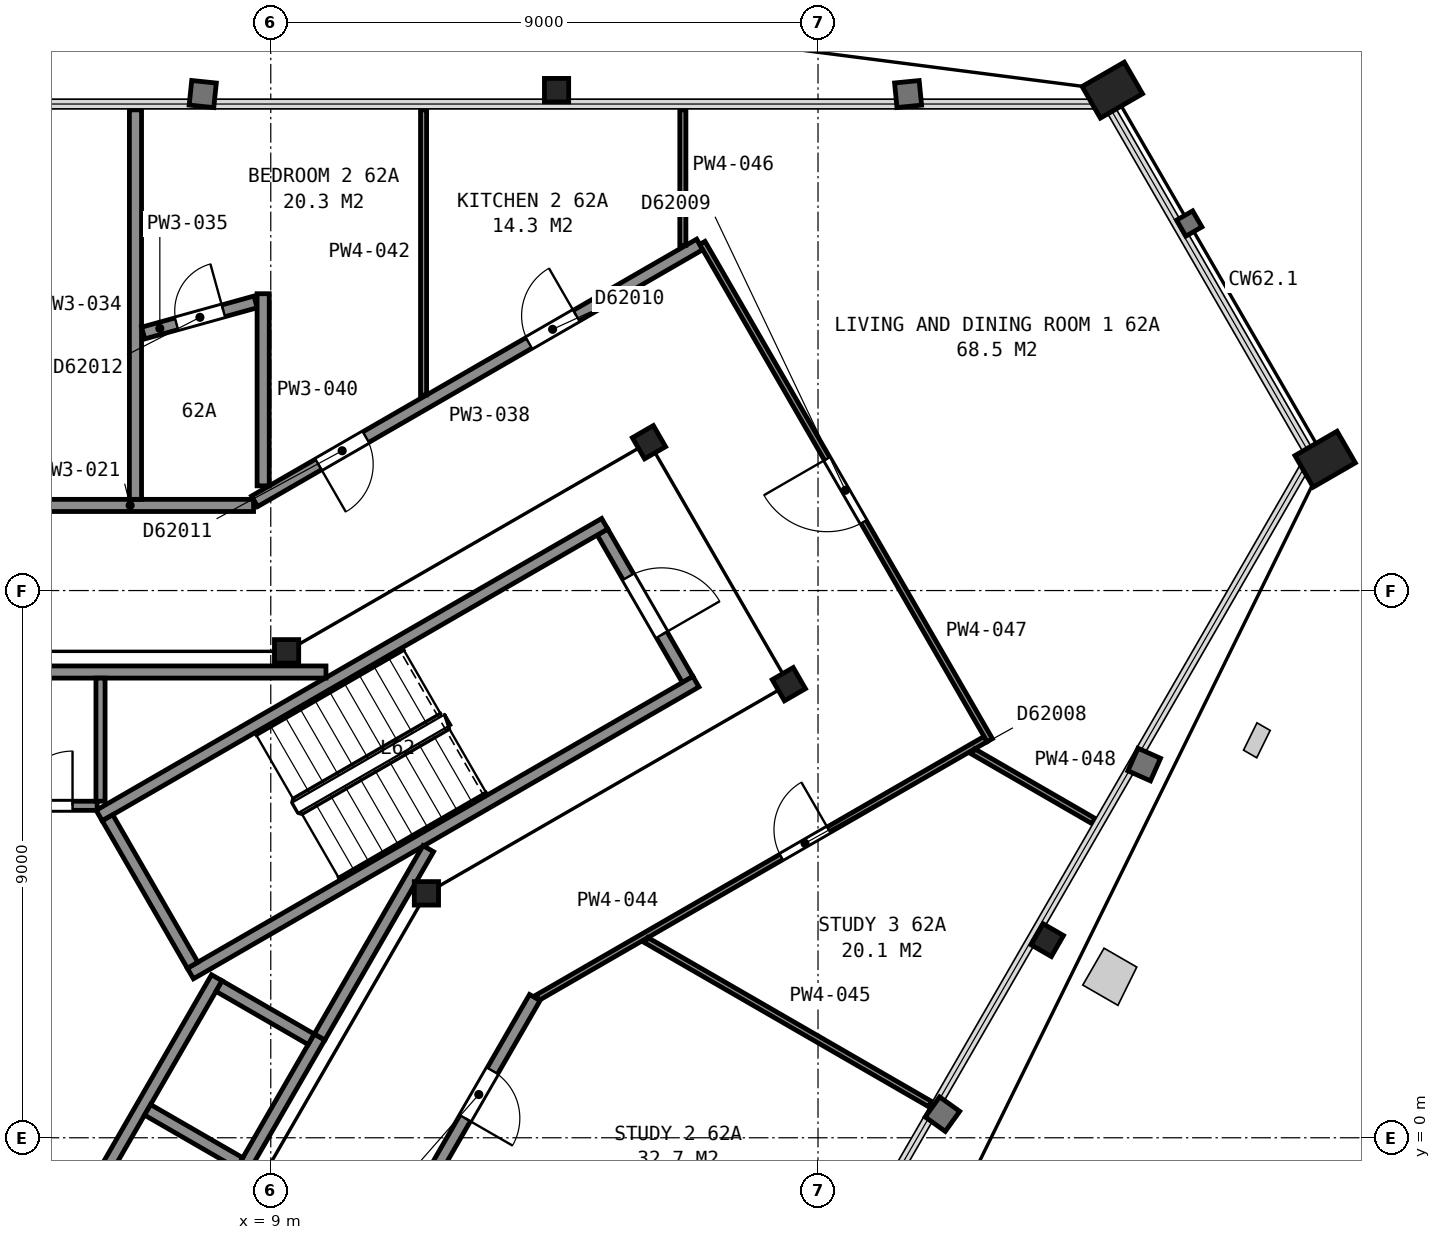
"""IFC4 building model, lengths in metres.
Left out: names, types, materials, properties, quantities, classifications, styles, units other than length and angle.
Written with IfcOpenShell. Run it as: python <this file> out.ifc"""

import sys

from ifc_helpers import new_model, si_unit, direction, frame, frame_2d, origin, origin_2d, place, context, subcontext, project, spatial, rectangle, hollow_rectangle, i_section, extrude, element, fill, save


model = new_model("IFC4")
c1 = context("Model", 3, precision=1e-05, world=origin(), true_north=direction((0.0, 1.0)))
c2 = subcontext(c1, "Body", "Model", "MODEL_VIEW")
j1 = project(units=[si_unit("LENGTHUNIT", "METRE"), si_unit("PLANEANGLEUNIT", "RADIAN")], contexts=[c1])
p1 = place(None, origin())
s1 = spatial("IfcSite", under=j1, at=p1, CompositionType="ELEMENT")
p2 = place(p1, origin())
s2 = spatial("IfcBuilding", under=s1, at=p2, CompositionType="ELEMENT")
p3 = place(p2, frame((0.0, 0.0, 247.1)))
s3 = spatial("IfcBuildingStorey", under=s2, at=p3, CompositionType="ELEMENT", Elevation=247.1)
p4 = place(p3, frame((22.84, 17.23, 0.065), z_axis=(0.0, 0.0, 1.0), x_axis=(0.5, -0.866025403784, 0.0)))
e1 = element("IfcColumn", 1, at=p4, inside=s3, PredefinedType="COLUMN", context=c2, shape_type="SweptSolid", body=[
    extrude(hollow_rectangle(XDim=0.6, YDim=0.8, WallThickness=0.05, at=origin_2d()), origin(), (0.0, 0.0, 1.0), 3.635),
])
for number, where, z_axis, x_axis in (
    (2, (13.7, 17.23, 0.035), (0.0, 0.0, 1.0), (1.0, 0.0, 0.0)),
    (3, (21.77, 3.25, 0.035), (0.0, 0.0, 1.0), (-0.5, -0.866, 0.0)),
):
    element("IfcColumn", number, at=place(p3, frame(where, z_axis=z_axis, x_axis=x_axis)), inside=s3, PredefinedType="COLUMN", context=c2, shape_type="SweptSolid", body=[
        extrude(i_section(OverallWidth=0.399, OverallDepth=0.386, WebThickness=0.021, FlangeThickness=0.033, FilletRadius=0.015, at=origin_2d()), origin(), (0.0, 0.0, 1.0), 3.665),
    ])
p5 = place(p3, frame((26.34, 11.16, 0.065), z_axis=(0.0, 0.0, 1.0), x_axis=(0.5, -0.866025403784, 0.0)))
e4 = element("IfcColumn", 4, at=p5, inside=s3, PredefinedType="COLUMN", context=c2, shape_type="SweptSolid", body=[
    extrude(hollow_rectangle(XDim=0.6, YDim=0.8, WallThickness=0.05, at=origin_2d()), origin(), (0.0, 0.0, 1.0), 3.635),
])
p6 = place(p3, frame((11.56, 4.02, 0.0), z_axis=(0.0, 0.0, 1.0), x_axis=(1.0, 0.0, 0.0)))
e5 = element("IfcColumn", 5, at=p6, inside=s3, PredefinedType="COLUMN", context=c2, shape_type="SweptSolid", body=[
    extrude(i_section(OverallWidth=0.399, OverallDepth=0.386, WebThickness=0.021, FlangeThickness=0.033, FilletRadius=0.015, at=origin_2d()), origin(), (0.0, 0.0, 1.0), 3.7),
])
for number, where, z_axis, x_axis in (
    (6, (17.52, 7.46, 0.0), (0.0, 0.0, 1.0), (0.5, -0.866, 0.0)),
    (7, (15.22, 11.44, 0.0), (0.0, 0.0, 1.0), (0.5, -0.866, 0.0)),
):
    element("IfcColumn", number, at=place(p3, frame(where, z_axis=z_axis, x_axis=x_axis)), inside=s3, PredefinedType="COLUMN", context=c2, shape_type="SweptSolid", body=[
        extrude(i_section(OverallWidth=0.401, OverallDepth=0.399, WebThickness=0.025, FlangeThickness=0.04, FilletRadius=0.015, at=origin_2d()), origin(), (0.0, 0.0, 1.0), 3.7),
    ])
p7 = place(p3, frame((9.26, 8.0, 0.0), z_axis=(0.0, 0.0, 1.0), x_axis=(1.0, 0.0, 0.0)))
e8 = element("IfcColumn", 8, at=p7, inside=s3, PredefinedType="COLUMN", context=c2, shape_type="SweptSolid", body=[
    extrude(i_section(OverallWidth=0.399, OverallDepth=0.386, WebThickness=0.021, FlangeThickness=0.033, FilletRadius=0.015, at=origin_2d()), origin(), (0.0, 0.0, 1.0), 3.7),
])
p8 = place(p3, frame((15.855, 7.538, 0.0), z_axis=(0.0, 0.0, 1.0), x_axis=(-0.500049511043, 0.865996816683, 0.0)))
e9 = element("IfcWall", 9, at=p8, inside=s3, PredefinedType="PARTITIONING", context=c2, shape_type="SweptSolid", body=[
    extrude(rectangle(XDim=2.8, YDim=0.2, at=frame_2d((1.4, 0.0))), origin(), (0.0, 0.0, 1.0), 3.45),
])
p9 = place(p8, frame((0.85, 0.0, 0.0)))
e10 = element("IfcOpeningElement", 10, at=p9, cuts=e9, PredefinedType="OPENING", context=c2, shape_type="SweptSolid", body=[
    extrude(rectangle(XDim=1.1, YDim=2.1, at=frame_2d((0.55, 1.05))), frame((0.0, 0.11, 0.0), z_axis=(0.0, -1.0, 0.0), x_axis=(1.0, 0.0, 0.0)), (0.0, 0.0, 1.0), 0.22),
])
for number, where, z_axis, x_axis in (
    (11, (6.178, 5.299, 0.0), (0.0, 0.0, 1.0), (0.866, 0.5, 0.0)),
    (12, (7.678, 2.701, 0.0), (0.0, 0.0, 1.0), (0.866, 0.5, 0.0)),
):
    element("IfcWall", number, at=place(p3, frame(where, z_axis=z_axis, x_axis=x_axis)), inside=s3, PredefinedType="PARTITIONING", context=c2, shape_type="SweptSolid", body=[
        extrude(rectangle(XDim=9.6, YDim=0.2, at=frame_2d((4.8, 0.0))), origin(), (0.0, 0.0, 1.0), 3.45),
    ])
p10 = place(p3, frame((7.715, 2.838, 0.0), z_axis=(0.0, 0.0, 1.0), x_axis=(-0.500049511043, 0.865996816683, 0.0)))
e13 = element("IfcWall", 13, at=p10, inside=s3, PredefinedType="PARTITIONING", context=c2, shape_type="SweptSolid", body=[
    extrude(rectangle(XDim=2.8, YDim=0.2, at=frame_2d((1.4, 0.0))), origin(), (0.0, 0.0, 1.0), 3.45),
])
p11 = place(p3, frame((7.351, -2.587, 0.0), z_axis=(0.0, 0.0, 1.0), x_axis=(0.500002801628, 0.866023786258, 0.0)))
e14 = element("IfcWall", 14, at=p11, inside=s3, PredefinedType="PARTITIONING", context=c2, shape_type="SweptSolid", body=[
    extrude(rectangle(XDim=4.9, YDim=0.2, at=frame_2d((2.45, 0.0))), origin(), (0.0, 0.0, 1.0), 3.7),
])
p12 = place(p3, frame((5.663, -1.612, 0.0), z_axis=(0.0, 0.0, 1.0), x_axis=(0.49998122708, 0.866036242063, 0.0)))
e15 = element("IfcWall", 15, at=p12, inside=s3, PredefinedType="PARTITIONING", context=c2, shape_type="SweptSolid", body=[
    extrude(rectangle(XDim=4.9, YDim=0.2, at=frame_2d((2.45, 0.0))), origin(), (0.0, 0.0, 1.0), 3.7),
])
p13 = place(p3, frame((9.665, 1.62, 0.0), z_axis=(0.0, 0.0, 1.0), x_axis=(-0.866002029911, 0.500040482552, 0.0)))
e16 = element("IfcWall", 16, at=p13, inside=s3, PredefinedType="PARTITIONING", context=c2, shape_type="SweptSolid", body=[
    extrude(rectangle(XDim=1.75, YDim=0.2, at=frame_2d((0.875, 0.0))), origin(), (0.0, 0.0, 1.0), 3.7),
])
p14 = place(p3, frame((8.49, -0.416, 0.0), z_axis=(0.0, 0.0, 1.0), x_axis=(-0.866036909293, 0.499980071345, 0.0)))
e17 = element("IfcWall", 17, at=p14, inside=s3, PredefinedType="PARTITIONING", context=c2, shape_type="SweptSolid", body=[
    extrude(rectangle(XDim=1.75, YDim=0.2, at=frame_2d((0.875, 0.0))), origin(), (0.0, 0.0, 1.0), 3.7),
])
p15 = place(p3, frame((-3.933, 7.66, 0.0), z_axis=(0.0, 0.0, 1.0), x_axis=(1.0, 0.0, 0.0)))
e18 = element("IfcWall", 18, at=p15, inside=s3, PredefinedType="PARTITIONING", context=c2, shape_type="SweptSolid", body=[
    extrude(rectangle(XDim=13.841, YDim=0.2, at=frame_2d((6.92, 0.0))), origin(), (0.0, 0.0, 1.0), 3.45),
])
p16 = place(p3, frame((0.925, 5.46, 0.0), z_axis=(0.0, 0.0, 1.0), x_axis=(1.0, 0.0, 0.0)))
e19 = element("IfcWall", 19, at=p16, inside=s3, PredefinedType="PARTITIONING", context=c2, shape_type="SweptSolid", body=[
    extrude(rectangle(XDim=5.22, YDim=0.15, at=frame_2d((2.61, 0.0))), origin(), (0.0, 0.0, 1.0), 3.45),
])
p17 = place(p16, frame((3.915, 0.0, 0.0)))
e20 = element("IfcOpeningElement", 20, at=p17, cuts=e19, PredefinedType="OPENING", context=c2, shape_type="SweptSolid", body=[
    extrude(rectangle(XDim=0.9, YDim=2.1, at=frame_2d((0.45, 1.05))), frame((0.0, 0.085, 0.0), z_axis=(0.0, -1.0, 0.0), x_axis=(1.0, 0.0, 0.0)), (0.0, 0.0, 1.0), 0.17),
])
p18 = place(p3, frame((6.2, 5.535, 0.0), z_axis=(0.0, 0.0, 1.0), x_axis=(0.0, 1.0, 0.0)))
e21 = element("IfcWall", 21, at=p18, inside=s3, PredefinedType="PARTITIONING", context=c2, shape_type="SweptSolid", body=[
    extrude(rectangle(XDim=2.025, YDim=0.15, at=frame_2d((1.013, 0.0))), origin(), (0.0, 0.0, 1.0), 3.45),
])
p19 = place(p3, frame((9.803, 1.658, 0.0), z_axis=(0.0, 0.0, 1.0), x_axis=(0.499943114462, 0.866058244174, 0.0)))
e22 = element("IfcWall", 22, at=p19, inside=s3, PredefinedType="PARTITIONING", context=c2, shape_type="SweptSolid", body=[
    extrude(rectangle(XDim=3.576, YDim=0.2, at=frame_2d((1.788, 0.0))), origin(), (0.0, 0.0, 1.0), 3.45),
])
p20 = place(p3, frame((-8.667, 10.4, 0.0), z_axis=(0.0, 0.0, 1.0), x_axis=(1.0, 0.0, 0.0)))
e23 = element("IfcWall", 23, at=p20, inside=s3, PredefinedType="PARTITIONING", context=c2, shape_type="SweptSolid", body=[
    extrude(rectangle(XDim=17.384, YDim=0.2, at=frame_2d((8.692, 0.0))), origin(), (0.0, 0.0, 1.0), 2.713),
])
p21 = place(p20, frame((12.425, 0.0, 0.0)))
e24 = element("IfcOpeningElement", 24, at=p21, cuts=e23, PredefinedType="OPENING", context=c2, shape_type="SweptSolid", body=[
    extrude(rectangle(XDim=0.9, YDim=2.1, at=frame_2d((0.45, 1.05))), frame((0.0, 0.11, 0.0), z_axis=(0.0, -1.0, 0.0), x_axis=(1.0, 0.0, 0.0)), (0.0, 0.0, 1.0), 0.22),
])
p22 = place(p20, frame((7.716, 0.0, 0.0)))
e25 = element("IfcOpeningElement", 25, at=p22, cuts=e23, PredefinedType="OPENING", context=c2, shape_type="SweptSolid", body=[
    extrude(rectangle(XDim=0.9, YDim=2.1, at=frame_2d((0.45, 1.05))), frame((0.0, 0.11, 0.0), z_axis=(0.0, -1.0, 0.0), x_axis=(1.0, 0.0, 0.0)), (0.0, 0.0, 1.0), 0.22),
])
p23 = place(p20, frame((3.358, 0.0, 0.0)))
e26 = element("IfcOpeningElement", 26, at=p23, cuts=e23, PredefinedType="OPENING", context=c2, shape_type="SweptSolid", body=[
    extrude(rectangle(XDim=0.9, YDim=2.1, at=frame_2d((0.45, 1.05))), frame((0.0, 0.11, 0.0), z_axis=(0.0, -1.0, 0.0), x_axis=(1.0, 0.0, 0.0)), (0.0, 0.0, 1.0), 0.22),
])
p24 = place(p3, frame((13.342, 2.306, 0.0), z_axis=(0.0, 0.0, 1.0), x_axis=(-0.499983003136, -0.866035216706, 0.0)))
e27 = element("IfcWall", 27, at=p24, inside=s3, PredefinedType="PARTITIONING", context=c2, shape_type="SweptSolid", body=[
    extrude(rectangle(XDim=17.385, YDim=0.2, at=frame_2d((8.692, 0.0))), origin(), (0.0, 0.0, 1.0), 2.713),
])
p25 = place(p24, frame((15.185, 0.0, 0.0)))
e28 = element("IfcOpeningElement", 28, at=p25, cuts=e27, PredefinedType="OPENING", context=c2, shape_type="SweptSolid", body=[
    extrude(rectangle(XDim=0.9, YDim=2.1, at=frame_2d((0.45, 1.05))), frame((0.0, 0.11, 0.0), z_axis=(0.0, -1.0, 0.0), x_axis=(1.0, 0.0, 0.0)), (0.0, 0.0, 1.0), 0.22),
])
p26 = place(p24, frame((12.094, 0.0, 0.0)))
e29 = element("IfcOpeningElement", 29, at=p26, cuts=e27, PredefinedType="OPENING", context=c2, shape_type="SweptSolid", body=[
    extrude(rectangle(XDim=0.9, YDim=2.1, at=frame_2d((0.45, 1.05))), frame((0.0, 0.11, 0.0), z_axis=(0.0, -1.0, 0.0), x_axis=(1.0, 0.0, 0.0)), (0.0, 0.0, 1.0), 0.22),
])
p27 = place(p24, frame((5.867, 0.0, 0.0)))
e30 = element("IfcOpeningElement", 30, at=p27, cuts=e27, PredefinedType="OPENING", context=c2, shape_type="SweptSolid", body=[
    extrude(rectangle(XDim=0.9, YDim=2.1, at=frame_2d((0.45, 1.05))), frame((0.0, 0.11, 0.0), z_axis=(0.0, -1.0, 0.0), x_axis=(1.0, 0.0, 0.0)), (0.0, 0.0, 1.0), 0.22),
])
p28 = place(p24, frame((1.392, 0.0, 0.0)))
e31 = element("IfcOpeningElement", 31, at=p28, cuts=e27, PredefinedType="OPENING", context=c2, shape_type="SweptSolid", body=[
    extrude(rectangle(XDim=0.9, YDim=2.1, at=frame_2d((0.45, 1.05))), frame((0.0, 0.11, 0.0), z_axis=(0.0, -1.0, 0.0), x_axis=(1.0, 0.0, 0.0)), (0.0, 0.0, 1.0), 0.22),
])
p29 = place(p3, frame((6.775, 10.5, 0.0), z_axis=(0.0, 0.0, 1.0), x_axis=(0.0, 1.0, 0.0)))
e32 = element("IfcWall", 32, at=p29, inside=s3, PredefinedType="PARTITIONING", context=c2, shape_type="SweptSolid", body=[
    extrude(rectangle(XDim=6.406, YDim=0.2, at=frame_2d((3.203, 0.0))), origin(), (0.0, 0.0, 1.0), 2.713),
])
p30 = place(p3, frame((8.75, 13.747, 0.0), z_axis=(0.0, 0.0, 1.0), x_axis=(-0.963674591663, -0.267079166884, 0.0)))
e33 = element("IfcWall", 33, at=p30, inside=s3, PredefinedType="PARTITIONING", context=c2, shape_type="SweptSolid", body=[
    extrude(rectangle(XDim=1.918, YDim=0.2, at=frame_2d((0.959, 0.0))), origin(), (0.0, 0.0, 1.0), 2.713),
])
p31 = place(p30, frame((0.549, 0.0, 0.0)))
e34 = element("IfcOpeningElement", 34, at=p31, cuts=e33, PredefinedType="OPENING", context=c2, shape_type="SweptSolid", body=[
    extrude(rectangle(XDim=0.8, YDim=2.1, at=frame_2d((0.4, 1.05))), frame((0.0, 0.11, 0.0), z_axis=(0.0, -1.0, 0.0), x_axis=(1.0, 0.0, 0.0)), (0.0, 0.0, 1.0), 0.22),
])
p32 = place(p3, frame((8.734, 10.468, 0.0), z_axis=(0.0, 0.0, 1.0), x_axis=(0.86608074249, 0.499904138298, 0.0)))
e35 = element("IfcWall", 35, at=p32, inside=s3, PredefinedType="PARTITIONING", context=c2, shape_type="SweptSolid", body=[
    extrude(rectangle(XDim=8.453, YDim=0.2, at=frame_2d((4.227, 0.0))), origin(), (0.0, 0.0, 1.0), 2.713),
])
p33 = place(p32, frame((5.209, 0.0, 0.0)))
e36 = element("IfcOpeningElement", 36, at=p33, cuts=e35, PredefinedType="OPENING", context=c2, shape_type="SweptSolid", body=[
    extrude(rectangle(XDim=0.9, YDim=2.1, at=frame_2d((0.45, 1.05))), frame((0.0, 0.11, 0.0), z_axis=(0.0, -1.0, 0.0), x_axis=(1.0, 0.0, 0.0)), (0.0, 0.0, 1.0), 0.22),
])
p34 = place(p32, frame((1.213, 0.0, 0.0)))
e37 = element("IfcOpeningElement", 37, at=p34, cuts=e35, PredefinedType="OPENING", context=c2, shape_type="SweptSolid", body=[
    extrude(rectangle(XDim=0.9, YDim=2.1, at=frame_2d((0.45, 1.05))), frame((0.0, 0.11, 0.0), z_axis=(0.0, -1.0, 0.0), x_axis=(1.0, 0.0, 0.0)), (0.0, 0.0, 1.0), 0.22),
])
p35 = place(p3, frame((8.875, 10.722, 0.0), z_axis=(0.0, 0.0, 1.0), x_axis=(0.0, 1.0, 0.0)))
e38 = element("IfcWall", 38, at=p35, inside=s3, PredefinedType="PARTITIONING", context=c2, shape_type="SweptSolid", body=[
    extrude(rectangle(XDim=3.16, YDim=0.2, at=frame_2d((1.58, 0.0))), origin(), (0.0, 0.0, 1.0), 2.713),
])
p36 = place(p3, frame((11.513, 12.215, 0.0), z_axis=(0.0, 0.0, 1.0), x_axis=(0.0, 1.0, 0.0)))
e39 = element("IfcWall", 39, at=p36, inside=s3, PredefinedType="PARTITIONING", context=c2, shape_type="SweptSolid", body=[
    extrude(rectangle(XDim=4.691, YDim=0.1, at=frame_2d((2.345, 0.0))), origin(), (0.0, 0.0, 1.0), 2.713),
])
p37 = place(p3, frame((20.756, 6.557, 0.0), z_axis=(0.0, 0.0, 1.0), x_axis=(-0.86606177021, -0.499937006213, 0.0)))
e40 = element("IfcWall", 40, at=p37, inside=s3, PredefinedType="PARTITIONING", context=c2, shape_type="SweptSolid", body=[
    extrude(rectangle(XDim=8.504, YDim=0.1, at=frame_2d((4.252, 0.0))), origin(), (0.0, 0.0, 1.0), 2.713),
])
p38 = place(p37, frame((2.979, 0.0, 0.0)))
e41 = element("IfcOpeningElement", 41, at=p38, cuts=e40, PredefinedType="OPENING", context=c2, shape_type="SweptSolid", body=[
    extrude(rectangle(XDim=0.9, YDim=2.1, at=frame_2d((0.45, 1.05))), frame((0.0, 0.06, 0.0), z_axis=(0.0, -1.0, 0.0), x_axis=(1.0, 0.0, 0.0)), (0.0, 0.0, 1.0), 0.12),
])
p39 = place(p3, frame((15.176, 3.25, 0.0), z_axis=(0.0, 0.0, 1.0), x_axis=(0.865941828667, -0.500144728419, 0.0)))
e42 = element("IfcWall", 42, at=p39, inside=s3, PredefinedType="PARTITIONING", context=c2, shape_type="SweptSolid", body=[
    extrude(rectangle(XDim=5.388, YDim=0.1, at=frame_2d((2.694, 0.0))), origin(), (0.0, 0.0, 1.0), 2.713),
])
p40 = place(p3, frame((15.777, 14.677, 0.0), z_axis=(0.0, 0.0, 1.0), x_axis=(0.0, 1.0, 0.0)))
e43 = element("IfcWall", 43, at=p40, inside=s3, PredefinedType="PARTITIONING", context=c2, shape_type="SweptSolid", body=[
    extrude(rectangle(XDim=2.229, YDim=0.1, at=frame_2d((1.114, 0.0))), origin(), (0.0, 0.0, 1.0), 2.713),
])
p41 = place(p3, frame((16.098, 14.718, 0.0), z_axis=(0.0, 0.0, 1.0), x_axis=(0.50030257167, -0.86585064346, 0.0)))
e44 = element("IfcWall", 44, at=p41, inside=s3, PredefinedType="PARTITIONING", context=c2, shape_type="SweptSolid", body=[
    extrude(rectangle(XDim=9.447, YDim=0.1, at=frame_2d((4.723, 0.0))), origin(), (0.0, 0.0, 1.0), 2.713),
])
p42 = place(p41, frame((4.1, 0.0, 0.0)))
e45 = element("IfcOpeningElement", 45, at=p42, cuts=e44, PredefinedType="OPENING", context=c2, shape_type="SweptSolid", body=[
    extrude(rectangle(XDim=1.2, YDim=2.1, at=frame_2d((0.6, 1.05))), frame((0.0, 0.06, 0.0), z_axis=(0.0, -1.0, 0.0), x_axis=(1.0, 0.0, 0.0)), (0.0, 0.0, 1.0), 0.12),
])
p43 = place(p3, frame((20.552, 6.353, 0.0), z_axis=(0.0, 0.0, 1.0), x_axis=(0.865865073245, -0.500277597875, 0.0)))
e46 = element("IfcWall", 46, at=p43, inside=s3, PredefinedType="PARTITIONING", context=c2, shape_type="SweptSolid", body=[
    extrude(rectangle(XDim=2.284, YDim=0.1, at=frame_2d((1.142, 0.0))), origin(), (0.0, 0.0, 1.0), 2.713),
])
p44 = place(p9, origin())
e47 = element("IfcDoor", 47, at=p44, inside=s3, OperationType="SINGLE_SWING_LEFT", PredefinedType="DOOR", context=c2, shape_type="SweptSolid", body=[
    extrude(rectangle(XDim=1.1, YDim=2.1, at=frame_2d((0.55, 1.05))), frame((0.0, 0.025, 0.0), z_axis=(0.0, -1.0, 0.0), x_axis=(1.0, 0.0, 0.0)), (0.0, 0.0, 1.0), 0.05),
])
fill(e10, e47)
p45 = place(p17, origin())
e48 = element("IfcDoor", 48, at=p45, inside=s3, OperationType="SINGLE_SWING_RIGHT", PredefinedType="DOOR", context=c2, shape_type="SweptSolid", body=[
    extrude(rectangle(XDim=0.9, YDim=2.1, at=frame_2d((0.45, 1.05))), frame((0.0, 0.025, 0.0), z_axis=(0.0, -1.0, 0.0), x_axis=(1.0, 0.0, 0.0)), (0.0, 0.0, 1.0), 0.05),
])
fill(e20, e48)
p46 = place(p28, origin())
e49 = element("IfcDoor", 49, at=p46, inside=s3, OperationType="SINGLE_SWING_RIGHT", PredefinedType="DOOR", context=c2, shape_type="SweptSolid", body=[
    extrude(rectangle(XDim=0.9, YDim=2.1, at=frame_2d((0.45, 1.05))), frame((0.0, 0.025, 0.0), z_axis=(0.0, -1.0, 0.0), x_axis=(1.0, 0.0, 0.0)), (0.0, 0.0, 1.0), 0.05),
])
fill(e31, e49)
p47 = place(p31, origin())
e50 = element("IfcDoor", 50, at=p47, inside=s3, OperationType="SINGLE_SWING_LEFT", PredefinedType="DOOR", context=c2, shape_type="SweptSolid", body=[
    extrude(rectangle(XDim=0.8, YDim=2.1, at=frame_2d((0.4, 1.05))), frame((0.0, 0.025, 0.0), z_axis=(0.0, -1.0, 0.0), x_axis=(1.0, 0.0, 0.0)), (0.0, 0.0, 1.0), 0.05),
])
fill(e34, e50)
p48 = place(p33, origin())
e51 = element("IfcDoor", 51, at=p48, inside=s3, OperationType="SINGLE_SWING_RIGHT", PredefinedType="DOOR", context=c2, shape_type="SweptSolid", body=[
    extrude(rectangle(XDim=0.9, YDim=2.1, at=frame_2d((0.45, 1.05))), frame((0.0, 0.025, 0.0), z_axis=(0.0, -1.0, 0.0), x_axis=(1.0, 0.0, 0.0)), (0.0, 0.0, 1.0), 0.05),
])
fill(e36, e51)
p49 = place(p34, origin())
e52 = element("IfcDoor", 52, at=p49, inside=s3, OperationType="SINGLE_SWING_LEFT", PredefinedType="DOOR", context=c2, shape_type="SweptSolid", body=[
    extrude(rectangle(XDim=0.9, YDim=2.1, at=frame_2d((0.45, 1.05))), frame((0.0, 0.025, 0.0), z_axis=(0.0, -1.0, 0.0), x_axis=(1.0, 0.0, 0.0)), (0.0, 0.0, 1.0), 0.05),
])
fill(e37, e52)
p50 = place(p38, origin())
e53 = element("IfcDoor", 53, at=p50, inside=s3, OperationType="SINGLE_SWING_LEFT", PredefinedType="DOOR", context=c2, shape_type="SweptSolid", body=[
    extrude(rectangle(XDim=0.9, YDim=2.1, at=frame_2d((0.45, 1.05))), frame((0.0, 0.025, 0.0), z_axis=(0.0, -1.0, 0.0), x_axis=(1.0, 0.0, 0.0)), (0.0, 0.0, 1.0), 0.05),
])
fill(e41, e53)
p51 = place(p42, origin())
e54 = element("IfcDoor", 54, at=p51, inside=s3, OperationType="SINGLE_SWING_LEFT", PredefinedType="DOOR", context=c2, shape_type="SweptSolid", body=[
    extrude(rectangle(XDim=1.2, YDim=2.1, at=frame_2d((0.6, 1.05))), frame((0.0, 0.025, 0.0), z_axis=(0.0, -1.0, 0.0), x_axis=(1.0, 0.0, 0.0)), (0.0, 0.0, 1.0), 0.05),
])
fill(e45, e54)
save(model, sys.argv[1])
